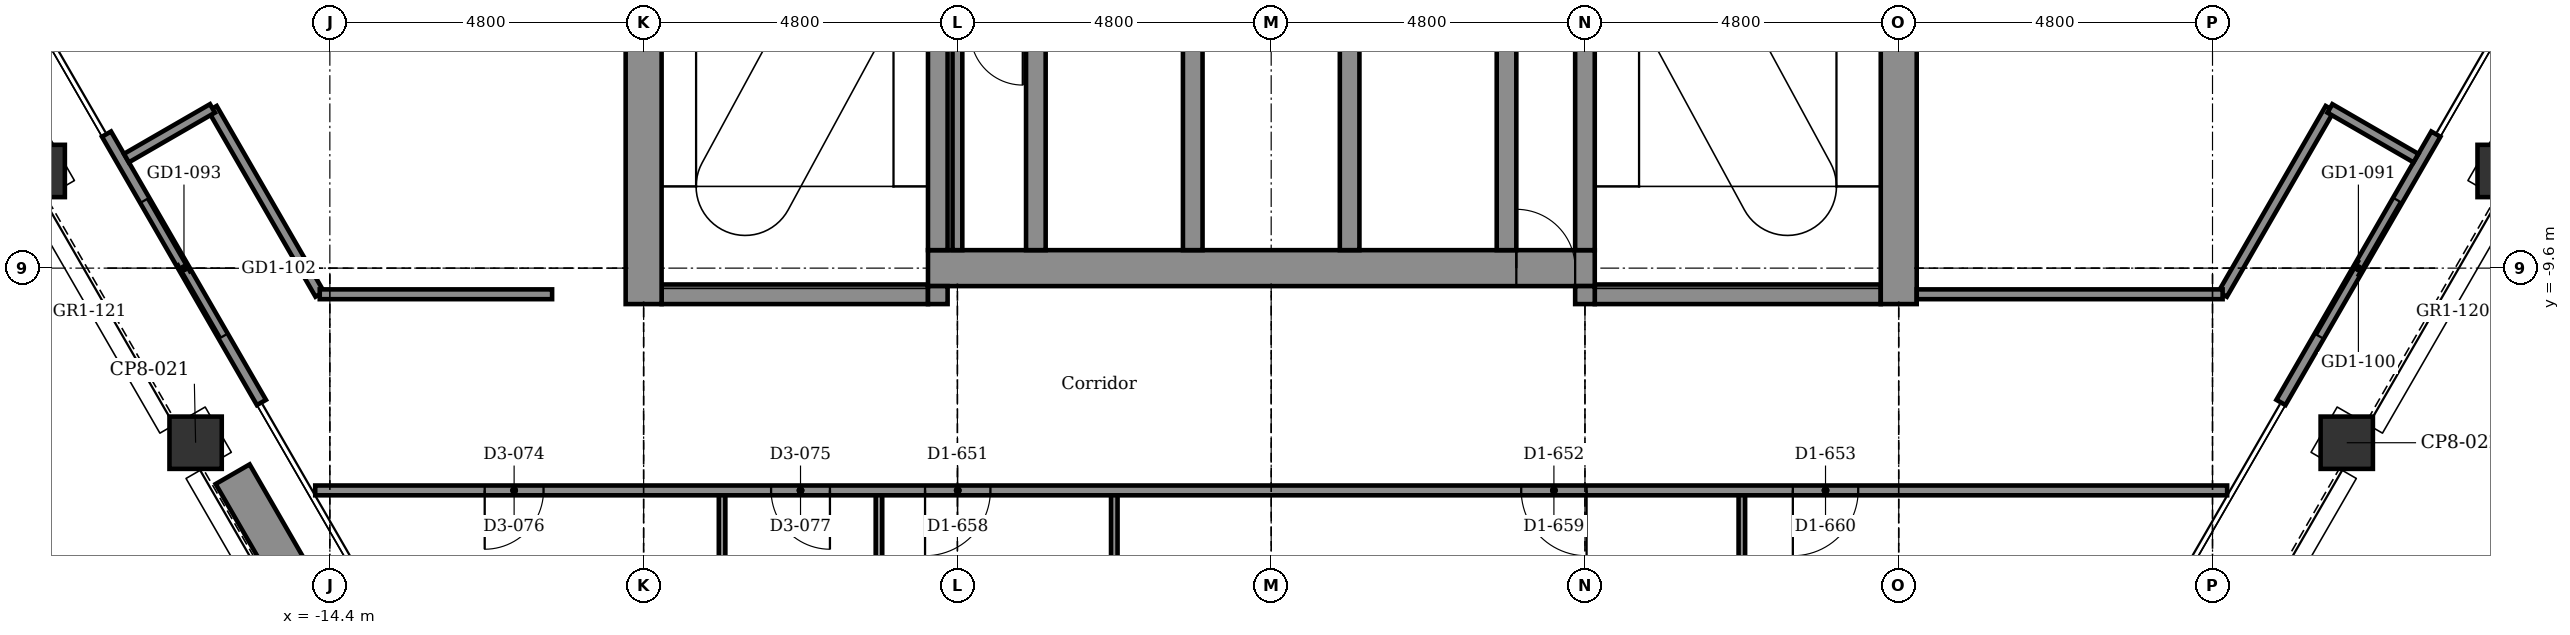
"""IFC4 building model, lengths in metres.
Left out: names, types, materials, properties, quantities, classifications, styles, units other than length and angle.
Written with IfcOpenShell. Run it as: python <this file> out.ifc"""

import sys

from ifc_helpers import new_model, si_unit, direction, frame, frame_2d, origin, origin_2d, place, context, subcontext, project, spatial, rectangle, extrude, element, fill, save


model = new_model("IFC4")
c1 = context("Model", 3, precision=1e-05, world=origin(), true_north=direction((0.0, 1.0)))
c2 = subcontext(c1, "Body", "Model", "MODEL_VIEW")
j1 = project(units=[si_unit("LENGTHUNIT", "METRE"), si_unit("PLANEANGLEUNIT", "RADIAN")], contexts=[c1])
p1 = place(None, origin())
s1 = spatial("IfcSite", under=j1, at=p1, CompositionType="ELEMENT")
p2 = place(p1, origin())
s2 = spatial("IfcBuilding", under=s1, at=p2, CompositionType="ELEMENT")
p3 = place(p2, frame((0.0, 0.0, 226.7)))
s3 = spatial("IfcBuildingStorey", under=s2, at=p3, CompositionType="ELEMENT", Elevation=226.7)
for number, where, z_axis, x_axis in (
    (1, (18.854, -8.114, -0.15), (0.0, 0.0, 1.0), (0.5, 0.866, 0.0)),
    (2, (16.454, -12.271, -0.15), (0.0, 0.0, 1.0), (0.5, 0.866, 0.0)),
    (3, (-16.454, -12.271, -0.15), (0.0, 0.0, 1.0), (0.866, 0.5, 0.0)),
    (4, (-18.854, -8.114, -0.15), (0.0, 0.0, 1.0), (0.866, 0.5, 0.0)),
):
    element("IfcColumn", number, at=place(p3, frame(where, z_axis=z_axis, x_axis=x_axis)), inside=s3, PredefinedType="COLUMN", context=c2, shape_type="SweptSolid", body=[
        extrude(rectangle(XDim=0.8, YDim=0.8, at=origin_2d()), origin(), (0.0, 0.0, 1.0), 3.9),
    ])
p4 = place(p3, frame((-9.325, -10.0, -0.15), z_axis=(0.0, 0.0, 1.0), x_axis=(1.0, 0.0, 0.0)))
e5 = element("IfcWall", 5, at=p4, inside=s3, PredefinedType="STANDARD", context=c2, shape_type="SweptSolid", body=[
    extrude(rectangle(XDim=4.075, YDim=0.3, at=frame_2d((2.038, 0.0))), origin(), (0.0, 0.0, 1.0), 3.9),
])
p5 = place(p3, frame((4.95, -10.0, -0.15), z_axis=(0.0, 0.0, 1.0), x_axis=(1.0, 0.0, 0.0)))
e6 = element("IfcWall", 6, at=p5, inside=s3, PredefinedType="STANDARD", context=c2, shape_type="SweptSolid", body=[
    extrude(rectangle(XDim=4.375, YDim=0.3, at=frame_2d((2.188, 0.0))), origin(), (0.0, 0.0, 1.0), 3.9),
])
p6 = place(p3, frame((-5.25, -9.6, -0.15), z_axis=(0.0, 0.0, 1.0), x_axis=(1.0, 0.0, 0.0)))
e7 = element("IfcWall", 7, at=p6, inside=s3, PredefinedType="SHEAR", context=c2, shape_type="SweptSolid", body=[
    extrude(rectangle(XDim=10.2, YDim=0.55, at=frame_2d((5.1, 0.0))), origin(), (0.0, 0.0, 1.0), 3.9),
])
p7 = place(p6, frame((9.0, 0.0, 0.15)))
e8 = element("IfcOpeningElement", 8, at=p7, cuts=e7, PredefinedType="OPENING", context=c2, shape_type="SweptSolid", body=[
    extrude(rectangle(XDim=0.9, YDim=2.1, at=frame_2d((0.45, 1.05))), frame((0.0, 0.285, 0.0), z_axis=(0.0, -1.0, 0.0), x_axis=(1.0, 0.0, 0.0)), (0.0, 0.0, 1.0), 0.57),
])
p8 = place(p3, frame((-9.6, -10.15, -0.15), z_axis=(0.0, 0.0, 1.0), x_axis=(0.0, 1.0, 0.0)))
e9 = element("IfcWall", 9, at=p8, inside=s3, PredefinedType="SHEAR", context=c2, shape_type="SweptSolid", body=[
    extrude(rectangle(XDim=7.6, YDim=0.55, at=frame_2d((3.8, 0.0))), origin(), (0.0, 0.0, 1.0), 3.9),
])
p9 = place(p3, frame((-5.1, -10.15, -0.15), z_axis=(0.0, 0.0, 1.0), x_axis=(0.0, 1.0, 0.0)))
e10 = element("IfcWall", 10, at=p9, inside=s3, PredefinedType="STANDARD", context=c2, shape_type="SweptSolid", body=[
    extrude(rectangle(XDim=0.275, YDim=0.3, at=frame_2d((0.137, 0.0))), origin(), (0.0, 0.0, 1.0), 3.9),
])
p10 = place(p3, frame((-5.1, -9.325, -0.15), z_axis=(0.0, 0.0, 1.0), x_axis=(0.0, 1.0, 0.0)))
e11 = element("IfcWall", 11, at=p10, inside=s3, PredefinedType="STANDARD", context=c2, shape_type="SweptSolid", body=[
    extrude(rectangle(XDim=7.075, YDim=0.3, at=frame_2d((3.538, 0.0))), origin(), (0.0, 0.0, 1.0), 3.9),
])
p11 = place(p10, frame((3.875, 0.0, 0.15)))
e12 = element("IfcOpeningElement", 12, at=p11, cuts=e11, PredefinedType="OPENING", context=c2, shape_type="SweptSolid", body=[
    extrude(rectangle(XDim=1.2, YDim=2.1, at=frame_2d((0.6, 1.05))), frame((0.0, 0.16, 0.0), z_axis=(0.0, -1.0, 0.0), x_axis=(1.0, 0.0, 0.0)), (0.0, 0.0, 1.0), 0.32),
])
for number, where, z_axis, x_axis in (
    (13, (-3.6, -9.325, -0.15), (0.0, 0.0, 1.0), (0.0, 1.0, 0.0)),
    (14, (-1.2, -9.325, -0.15), (0.0, 0.0, 1.0), (0.0, 1.0, 0.0)),
    (15, (1.2, -9.325, -0.15), (0.0, 0.0, 1.0), (0.0, 1.0, 0.0)),
    (16, (3.6, -9.325, -0.15), (0.0, 0.0, 1.0), (0.0, 1.0, 0.0)),
):
    element("IfcWall", number, at=place(p3, frame(where, z_axis=z_axis, x_axis=x_axis)), inside=s3, PredefinedType="STANDARD", context=c2, shape_type="SweptSolid", body=[
        extrude(rectangle(XDim=3.475, YDim=0.3, at=frame_2d((1.737, 0.0))), origin(), (0.0, 0.0, 1.0), 3.9),
    ])
p12 = place(p3, frame((4.8, -10.15, -0.15), z_axis=(0.0, 0.0, 1.0), x_axis=(0.0, 1.0, 0.0)))
e17 = element("IfcWall", 17, at=p12, inside=s3, PredefinedType="STANDARD", context=c2, shape_type="SweptSolid", body=[
    extrude(rectangle(XDim=0.275, YDim=0.3, at=frame_2d((0.137, 0.0))), origin(), (0.0, 0.0, 1.0), 3.9),
])
p13 = place(p3, frame((4.8, -9.325, -0.15), z_axis=(0.0, 0.0, 1.0), x_axis=(0.0, 1.0, 0.0)))
e18 = element("IfcWall", 18, at=p13, inside=s3, PredefinedType="STANDARD", context=c2, shape_type="SweptSolid", body=[
    extrude(rectangle(XDim=7.075, YDim=0.3, at=frame_2d((3.538, 0.0))), origin(), (0.0, 0.0, 1.0), 3.9),
])
p14 = place(p13, frame((3.875, 0.0, 0.15)))
e19 = element("IfcOpeningElement", 19, at=p14, cuts=e18, PredefinedType="OPENING", context=c2, shape_type="SweptSolid", body=[
    extrude(rectangle(XDim=1.2, YDim=2.1, at=frame_2d((0.6, 1.05))), frame((0.0, 0.16, 0.0), z_axis=(0.0, -1.0, 0.0), x_axis=(1.0, 0.0, 0.0)), (0.0, 0.0, 1.0), 0.32),
])
p15 = place(p3, frame((9.6, -10.15, -0.15), z_axis=(0.0, 0.0, 1.0), x_axis=(0.0, 1.0, 0.0)))
e20 = element("IfcWall", 20, at=p15, inside=s3, PredefinedType="SHEAR", context=c2, shape_type="SweptSolid", body=[
    extrude(rectangle(XDim=20.075, YDim=0.55, at=frame_2d((10.038, 0.0))), origin(), (0.0, 0.0, 1.0), 3.9),
])
p16 = place(p3, frame((17.817, -7.55, 0.0), z_axis=(0.0, 0.0, 1.0), x_axis=(-0.499978080042, -0.866038058908, 0.0)))
e21 = element("IfcWall", 21, at=p16, inside=s3, PredefinedType="PARTITIONING", context=c2, shape_type="SweptSolid", body=[
    extrude(rectangle(XDim=4.74, YDim=0.16, at=frame_2d((2.37, 0.0))), origin(), (0.0, 0.0, 1.0), 3.75),
])
p17 = place(p16, frame((1.17, 0.0, 0.0)))
e22 = element("IfcOpeningElement", 22, at=p17, cuts=e21, PredefinedType="OPENING", context=c2, shape_type="SweptSolid", body=[
    extrude(rectangle(XDim=2.4, YDim=2.4, at=frame_2d((1.2, 1.2))), frame((0.0, 0.09, 0.0), z_axis=(0.0, -1.0, 0.0), x_axis=(1.0, 0.0, 0.0)), (0.0, 0.0, 1.0), 0.18),
])
p18 = place(p3, frame((-15.447, -11.655, 0.0), z_axis=(0.0, 0.0, 1.0), x_axis=(-0.499978080042, 0.866038058908, 0.0)))
e23 = element("IfcWall", 23, at=p18, inside=s3, PredefinedType="PARTITIONING", context=c2, shape_type="SweptSolid", body=[
    extrude(rectangle(XDim=4.74, YDim=0.16, at=frame_2d((2.37, 0.0))), origin(), (0.0, 0.0, 1.0), 3.75),
])
p19 = place(p18, frame((1.17, 0.0, 0.0)))
e24 = element("IfcOpeningElement", 24, at=p19, cuts=e23, PredefinedType="OPENING", context=c2, shape_type="SweptSolid", body=[
    extrude(rectangle(XDim=2.4, YDim=2.4, at=frame_2d((1.2, 1.2))), frame((0.0, 0.09, 0.0), z_axis=(0.0, -1.0, 0.0), x_axis=(1.0, 0.0, 0.0)), (0.0, 0.0, 1.0), 0.18),
])
p20 = place(p3, frame((-14.187, -15.697, 0.0), z_axis=(0.0, 0.0, 1.0), x_axis=(-0.499977295307, 0.866038511948, 0.0)))
e25 = element("IfcWall", 25, at=p20, inside=s3, PredefinedType="USERDEFINED", context=c2, shape_type="SweptSolid", body=[
    extrude(rectangle(XDim=3.4, YDim=0.6, at=frame_2d((1.7, 0.0))), origin(), (0.0, 0.0, 1.0), 0.7),
])
p21 = place(p3, frame((7.2, -19.115, 0.0), z_axis=(0.0, 0.0, 1.0), x_axis=(0.0, 1.0, 0.0)))
e26 = element("IfcWall", 26, at=p21, inside=s3, PredefinedType="PARTITIONING", context=c2, shape_type="SweptSolid", body=[
    extrude(rectangle(XDim=6.115, YDim=0.1, at=frame_2d((3.057, 0.0))), origin(), (0.0, 0.0, 1.0), 3.75),
])
p22 = place(p3, frame((-2.4, -19.125, 0.0), z_axis=(0.0, 0.0, 1.0), x_axis=(0.0, 1.0, 0.0)))
e27 = element("IfcWall", 27, at=p22, inside=s3, PredefinedType="PARTITIONING", context=c2, shape_type="SweptSolid", body=[
    extrude(rectangle(XDim=6.125, YDim=0.1, at=frame_2d((3.062, 0.0))), origin(), (0.0, 0.0, 1.0), 3.75),
])
p23 = place(p3, frame((-4.8, -9.325, 0.0), z_axis=(0.0, 0.0, 1.0), x_axis=(0.0, 1.0, 0.0)))
e28 = element("IfcWall", 28, at=p23, inside=s3, PredefinedType="PARTITIONING", context=c2, shape_type="SweptSolid", body=[
    extrude(rectangle(XDim=3.325, YDim=0.15, at=frame_2d((1.663, 0.0))), origin(), (0.0, 0.0, 1.0), 3.75),
])
for number, where, z_axis, x_axis in (
    (29, (-6.0, -19.0, 0.0), (0.0, 0.0, 1.0), (0.0, 1.0, 0.0)),
    (30, (-8.4, -19.0, 0.0), (0.0, 0.0, 1.0), (0.0, 1.0, 0.0)),
):
    element("IfcWall", number, at=place(p3, frame(where, z_axis=z_axis, x_axis=x_axis)), inside=s3, PredefinedType="PARTITIONING", context=c2, shape_type="SweptSolid", body=[
        extrude(rectangle(XDim=6.0, YDim=0.1, at=frame_2d((3.0, 0.0))), origin(), (0.0, 0.0, 1.0), 3.75),
    ])
for number, where, z_axis, x_axis in (
    (31, (-16.196, -7.157, 0.0), (0.0, 0.0, 1.0), (0.5, -0.866, 0.0)),
    (32, (14.555, -10.0, 0.0), (0.0, 0.0, 1.0), (0.5, 0.866, 0.0)),
):
    element("IfcWall", number, at=place(p3, frame(where, z_axis=z_axis, x_axis=x_axis)), inside=s3, PredefinedType="PARTITIONING", context=c2, shape_type="SweptSolid", body=[
        extrude(rectangle(XDim=3.283, YDim=0.15, at=frame_2d((1.642, 0.0))), origin(), (0.0, 0.0, 1.0), 3.75),
    ])
for number, where, z_axis, x_axis in (
    (33, (16.196, -7.157, 0.0), (0.0, 0.0, 1.0), (0.866, -0.5, 0.0)),
    (34, (-17.512, -7.917, 0.0), (0.0, 0.0, 1.0), (0.866, 0.5, 0.0)),
):
    element("IfcWall", number, at=place(p3, frame(where, z_axis=z_axis, x_axis=x_axis)), inside=s3, PredefinedType="PARTITIONING", context=c2, shape_type="SweptSolid", body=[
        extrude(rectangle(XDim=1.52, YDim=0.15, at=frame_2d((0.76, 0.0))), origin(), (0.0, 0.0, 1.0), 3.75),
    ])
p24 = place(p3, frame((-14.624, -13.0, 0.0), z_axis=(0.0, 0.0, 1.0), x_axis=(1.0, 0.0, 0.0)))
e35 = element("IfcWall", 35, at=p24, inside=s3, PredefinedType="PARTITIONING", context=c2, shape_type="SweptSolid", body=[
    extrude(rectangle(XDim=29.248, YDim=0.15, at=frame_2d((14.624, 0.0))), origin(), (0.0, 0.0, 1.0), 3.75),
])
p25 = place(p24, frame((2.593, 0.0, 0.0)))
e36 = element("IfcOpeningElement", 36, at=p25, cuts=e35, PredefinedType="OPENING", context=c2, shape_type="SweptSolid", body=[
    extrude(rectangle(XDim=0.9, YDim=2.1, at=frame_2d((0.45, 1.05))), frame((0.0, 0.085, 0.0), z_axis=(0.0, -1.0, 0.0), x_axis=(1.0, 0.0, 0.0)), (0.0, 0.0, 1.0), 0.17),
])
p26 = place(p24, frame((6.974, 0.0, 0.0)))
e37 = element("IfcOpeningElement", 37, at=p26, cuts=e35, PredefinedType="OPENING", context=c2, shape_type="SweptSolid", body=[
    extrude(rectangle(XDim=0.9, YDim=2.1, at=frame_2d((0.45, 1.05))), frame((0.0, 0.085, 0.0), z_axis=(0.0, -1.0, 0.0), x_axis=(1.0, 0.0, 0.0)), (0.0, 0.0, 1.0), 0.17),
])
p27 = place(p24, frame((9.329, 0.0, 0.0)))
e38 = element("IfcOpeningElement", 38, at=p27, cuts=e35, PredefinedType="OPENING", context=c2, shape_type="SweptSolid", body=[
    extrude(rectangle(XDim=1.0, YDim=2.1, at=frame_2d((0.5, 1.05))), frame((0.0, 0.085, 0.0), z_axis=(0.0, -1.0, 0.0), x_axis=(1.0, 0.0, 0.0)), (0.0, 0.0, 1.0), 0.17),
])
p28 = place(p24, frame((18.449, 0.0, 0.0)))
e39 = element("IfcOpeningElement", 39, at=p28, cuts=e35, PredefinedType="OPENING", context=c2, shape_type="SweptSolid", body=[
    extrude(rectangle(XDim=1.0, YDim=2.1, at=frame_2d((0.5, 1.05))), frame((0.0, 0.085, 0.0), z_axis=(0.0, -1.0, 0.0), x_axis=(1.0, 0.0, 0.0)), (0.0, 0.0, 1.0), 0.17),
])
p29 = place(p24, frame((22.604, 0.0, 0.0)))
e40 = element("IfcOpeningElement", 40, at=p29, cuts=e35, PredefinedType="OPENING", context=c2, shape_type="SweptSolid", body=[
    extrude(rectangle(XDim=1.0, YDim=2.1, at=frame_2d((0.5, 1.05))), frame((0.0, 0.085, 0.0), z_axis=(0.0, -1.0, 0.0), x_axis=(1.0, 0.0, 0.0)), (0.0, 0.0, 1.0), 0.17),
])
p30 = place(p3, frame((-14.555, -10.0, 0.0), z_axis=(0.0, 0.0, 1.0), x_axis=(1.0, 0.0, 0.0)))
e41 = element("IfcWall", 41, at=p30, inside=s3, PredefinedType="PARTITIONING", context=c2, shape_type="SweptSolid", body=[
    extrude(rectangle(XDim=3.555, YDim=0.15, at=frame_2d((1.777, 0.0))), origin(), (0.0, 0.0, 1.0), 3.75),
])
p31 = place(p3, frame((9.875, -10.0, 0.0), z_axis=(0.0, 0.0, 1.0), x_axis=(1.0, 0.0, 0.0)))
e42 = element("IfcWall", 42, at=p31, inside=s3, PredefinedType="PARTITIONING", context=c2, shape_type="SweptSolid", body=[
    extrude(rectangle(XDim=4.68, YDim=0.15, at=frame_2d((2.34, 0.0))), origin(), (0.0, 0.0, 1.0), 3.75),
])
p32 = place(p17, origin())
e43 = element("IfcDoor", 43, at=p32, inside=s3, OperationType="DOUBLE_DOOR_SLIDING", PredefinedType="DOOR", context=c2, shape_type="SweptSolid", body=[
    extrude(rectangle(XDim=2.4, YDim=2.4, at=frame_2d((1.2, 1.2))), frame((0.0, 0.025, 0.0), z_axis=(0.0, -1.0, 0.0), x_axis=(1.0, 0.0, 0.0)), (0.0, 0.0, 1.0), 0.05),
])
fill(e22, e43)
p33 = place(p19, origin())
e44 = element("IfcDoor", 44, at=p33, inside=s3, OperationType="DOUBLE_DOOR_SLIDING", PredefinedType="DOOR", context=c2, shape_type="SweptSolid", body=[
    extrude(rectangle(XDim=2.4, YDim=2.4, at=frame_2d((1.2, 1.2))), frame((0.0, 0.025, 0.0), z_axis=(0.0, -1.0, 0.0), x_axis=(1.0, 0.0, 0.0)), (0.0, 0.0, 1.0), 0.05),
])
fill(e24, e44)
p34 = place(p25, frame((0.9, 0.0, 0.0), z_axis=(0.0, 0.0, 1.0), x_axis=(-1.0, 0.0, 0.0)))
e45 = element("IfcDoor", 45, at=p34, inside=s3, OperationType="SINGLE_SWING_LEFT", PredefinedType="DOOR", context=c2, shape_type="SweptSolid", body=[
    extrude(rectangle(XDim=0.9, YDim=2.1, at=frame_2d((0.45, 1.05))), frame((0.0, 0.025, 0.0), z_axis=(0.0, -1.0, 0.0), x_axis=(1.0, 0.0, 0.0)), (0.0, 0.0, 1.0), 0.05),
])
fill(e36, e45)
p35 = place(p26, frame((0.9, 0.0, 0.0), z_axis=(0.0, 0.0, 1.0), x_axis=(-1.0, 0.0, 0.0)))
e46 = element("IfcDoor", 46, at=p35, inside=s3, OperationType="SINGLE_SWING_RIGHT", PredefinedType="DOOR", context=c2, shape_type="SweptSolid", body=[
    extrude(rectangle(XDim=0.9, YDim=2.1, at=frame_2d((0.45, 1.05))), frame((0.0, 0.025, 0.0), z_axis=(0.0, -1.0, 0.0), x_axis=(1.0, 0.0, 0.0)), (0.0, 0.0, 1.0), 0.05),
])
fill(e37, e46)
p36 = place(p27, frame((1.0, 0.0, 0.0), z_axis=(0.0, 0.0, 1.0), x_axis=(-1.0, 0.0, 0.0)))
e47 = element("IfcDoor", 47, at=p36, inside=s3, OperationType="SINGLE_SWING_LEFT", PredefinedType="DOOR", context=c2, shape_type="SweptSolid", body=[
    extrude(rectangle(XDim=1.0, YDim=2.1, at=frame_2d((0.5, 1.05))), frame((0.0, 0.025, 0.0), z_axis=(0.0, -1.0, 0.0), x_axis=(1.0, 0.0, 0.0)), (0.0, 0.0, 1.0), 0.05),
])
fill(e38, e47)
p37 = place(p28, frame((1.0, 0.0, 0.0), z_axis=(0.0, 0.0, 1.0), x_axis=(-1.0, 0.0, 0.0)))
e48 = element("IfcDoor", 48, at=p37, inside=s3, OperationType="SINGLE_SWING_RIGHT", PredefinedType="DOOR", context=c2, shape_type="SweptSolid", body=[
    extrude(rectangle(XDim=1.0, YDim=2.1, at=frame_2d((0.5, 1.05))), frame((0.0, 0.025, 0.0), z_axis=(0.0, -1.0, 0.0), x_axis=(1.0, 0.0, 0.0)), (0.0, 0.0, 1.0), 0.05),
])
fill(e39, e48)
p38 = place(p29, frame((1.0, 0.0, 0.0), z_axis=(0.0, 0.0, 1.0), x_axis=(-1.0, 0.0, 0.0)))
e49 = element("IfcDoor", 49, at=p38, inside=s3, OperationType="SINGLE_SWING_LEFT", PredefinedType="DOOR", context=c2, shape_type="SweptSolid", body=[
    extrude(rectangle(XDim=1.0, YDim=2.1, at=frame_2d((0.5, 1.05))), frame((0.0, 0.025, 0.0), z_axis=(0.0, -1.0, 0.0), x_axis=(1.0, 0.0, 0.0)), (0.0, 0.0, 1.0), 0.05),
])
fill(e40, e49)
p39 = place(p7, origin())
e50 = element("IfcDoor", 50, at=p39, inside=s3, OperationType="SINGLE_SWING_LEFT", PredefinedType="DOOR", context=c2, shape_type="SweptSolid", body=[
    extrude(rectangle(XDim=0.9, YDim=2.1, at=frame_2d((0.45, 1.05))), frame((0.0, 0.025, 0.0), z_axis=(0.0, -1.0, 0.0), x_axis=(1.0, 0.0, 0.0)), (0.0, 0.0, 1.0), 0.05),
])
fill(e8, e50)
save(model, sys.argv[1])
